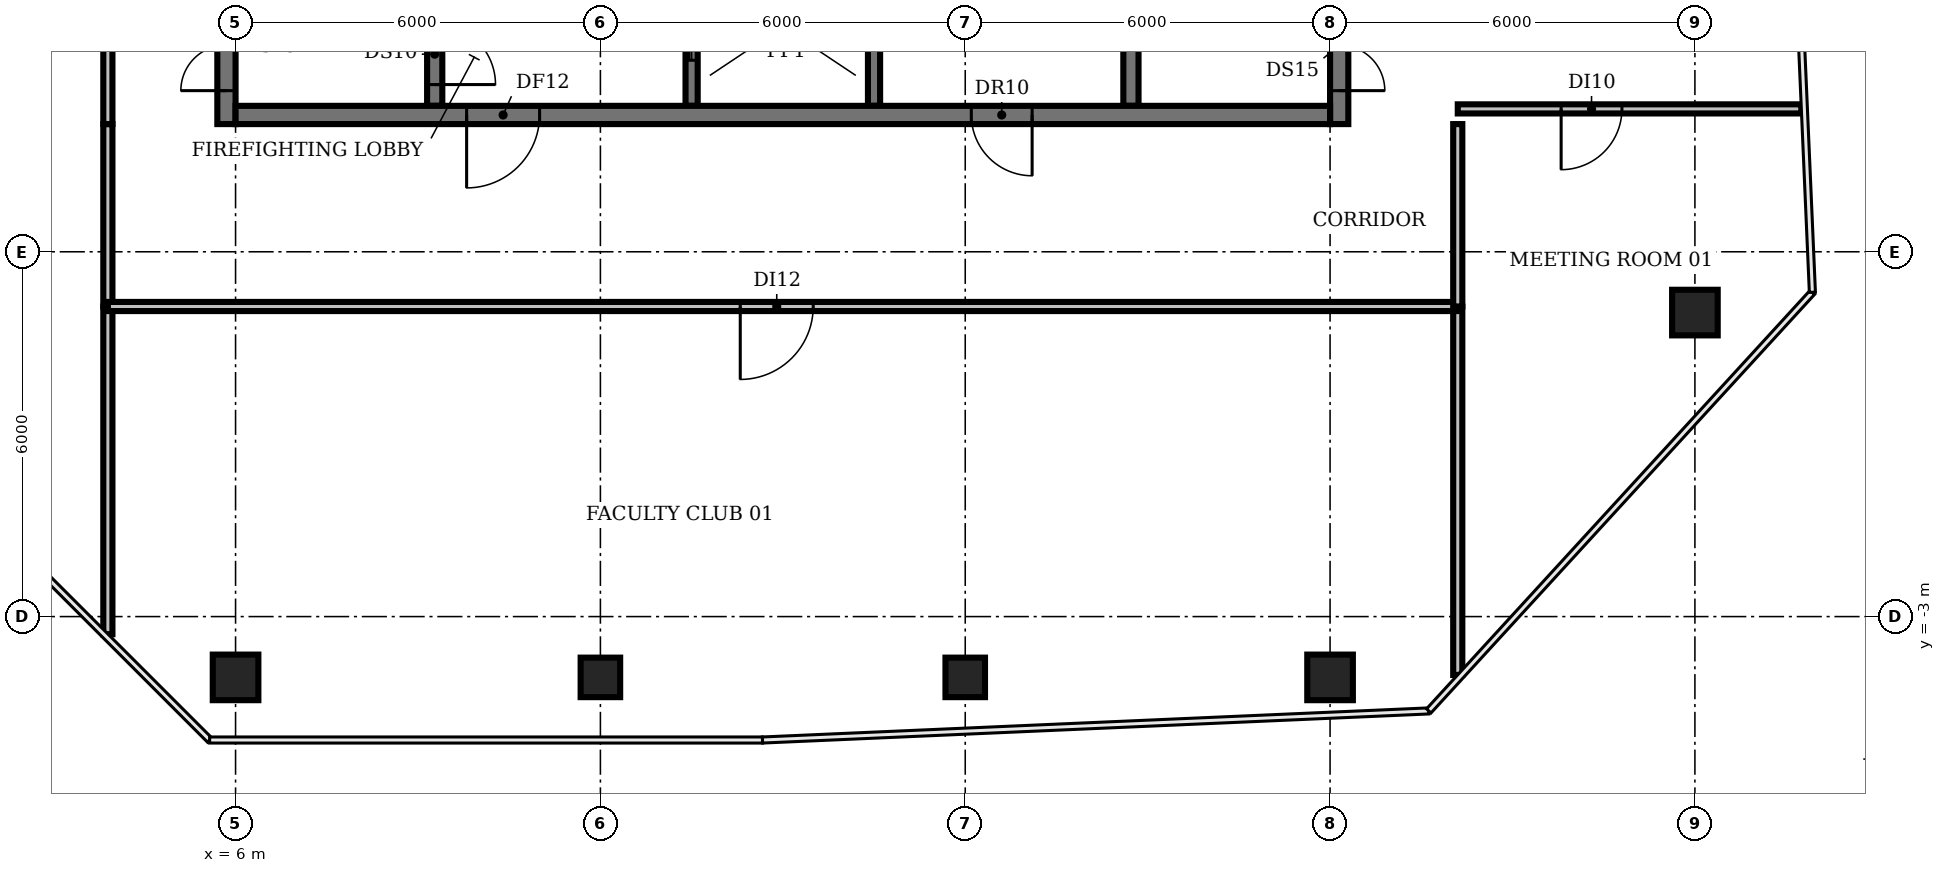
"""IFC4 building model, lengths in metres.
Left out: names, types, materials, properties, quantities, classifications, styles, units other than length and angle.
Written with IfcOpenShell. Run it as: python <this file> out.ifc"""

import sys

from ifc_helpers import new_model, si_unit, direction, frame, frame_2d, origin, origin_2d, place, context, subcontext, project, spatial, rectangle, circle, extrude, element, fill, save


model = new_model("IFC4")
c1 = context("Model", 3, precision=1e-05, world=origin(), true_north=direction((0.0, 1.0)))
c2 = subcontext(c1, "Body", "Model", "MODEL_VIEW")
j1 = project(units=[si_unit("LENGTHUNIT", "METRE"), si_unit("PLANEANGLEUNIT", "RADIAN")], contexts=[c1])
p1 = place(None, origin())
s1 = spatial("IfcSite", under=j1, at=p1, CompositionType="ELEMENT")
p2 = place(p1, origin())
s2 = spatial("IfcBuilding", under=s1, at=p2, CompositionType="ELEMENT")
p3 = place(p2, frame((0.0, 0.0, 323.0)))
s3 = spatial("IfcBuildingStorey", under=s2, at=p3, CompositionType="ELEMENT", Elevation=323.0)
p4 = place(p3, frame((6.0, -4.0, 0.0), z_axis=(0.0, 0.0, 1.0), x_axis=(1.0, 0.0, 0.0)))
e1 = element("IfcColumn", 1, at=p4, inside=s3, PredefinedType="COLUMN", context=c2, shape_type="SweptSolid", body=[
    extrude(circle(Radius=0.375, at=origin_2d()), origin(), (0.0, 0.0, 1.0), 3.9),
])
for number, where, z_axis, x_axis in (
    (2, (12.0, -4.0, 0.0), (0.0, 0.0, 1.0), (1.0, 0.0, 0.0)),
    (3, (18.0, -4.0, 0.0), (0.0, 0.0, 1.0), (1.0, 0.0, 0.0)),
):
    element("IfcColumn", number, at=place(p3, frame(where, z_axis=z_axis, x_axis=x_axis)), inside=s3, PredefinedType="COLUMN", context=c2, shape_type="SweptSolid", body=[
        extrude(rectangle(XDim=0.65, YDim=0.65, at=origin_2d()), origin(), (0.0, 0.0, 1.0), 3.9),
    ])
for number, where, z_axis, x_axis in (
    (4, (24.0, -4.0, 0.0), (0.0, 0.0, 1.0), (1.0, 0.0, 0.0)),
    (5, (30.0, 2.0, 0.0), (0.0, 0.0, 1.0), (1.0, 0.0, 0.0)),
):
    element("IfcColumn", number, at=place(p3, frame(where, z_axis=z_axis, x_axis=x_axis)), inside=s3, PredefinedType="COLUMN", context=c2, shape_type="SweptSolid", body=[
        extrude(circle(Radius=0.375, at=origin_2d()), origin(), (0.0, 0.0, 1.0), 3.9),
    ])
p5 = place(p3, frame((9.275, 11.825, 0.0), z_axis=(0.0, 0.0, 1.0), x_axis=(0.0, -1.0, 0.0)))
e6 = element("IfcWall", 6, at=p5, inside=s3, PredefinedType="SHEAR", context=c2, shape_type="SweptSolid", body=[
    extrude(rectangle(XDim=6.425, YDim=0.25, at=frame_2d((3.212, 0.0))), origin(), (0.0, 0.0, 1.0), 3.9),
])
p6 = place(p5, frame((5.075, 0.0, 0.0)))
e7 = element("IfcOpeningElement", 7, at=p6, cuts=e6, PredefinedType="OPENING", context=c2, shape_type="SweptSolid", body=[
    extrude(rectangle(XDim=1.0, YDim=2.1, at=frame_2d((0.5, 1.05))), frame((0.0, 0.135, 0.0), z_axis=(0.0, -1.0, 0.0), x_axis=(1.0, 0.0, 0.0)), (0.0, 0.0, 1.0), 0.27),
])
p7 = place(p3, frame((13.5, 5.4, 0.0), z_axis=(0.0, 0.0, 1.0), x_axis=(0.0, 1.0, 0.0)))
e8 = element("IfcWall", 8, at=p7, inside=s3, PredefinedType="SHEAR", context=c2, shape_type="SweptSolid", body=[
    extrude(rectangle(XDim=8.2, YDim=0.2, at=frame_2d((4.1, 0.0))), origin(), (0.0, 0.0, 1.0), 3.9),
])
p8 = place(p7, frame((0.75, 0.0, 0.0)))
e9 = element("IfcOpeningElement", 9, at=p8, cuts=e8, PredefinedType="OPENING", context=c2, shape_type="SweptSolid", body=[
    extrude(rectangle(XDim=1.1, YDim=2.1, at=frame_2d((0.55, 1.05))), frame((0.0, 0.11, 0.0), z_axis=(0.0, -1.0, 0.0), x_axis=(1.0, 0.0, 0.0)), (0.0, 0.0, 1.0), 0.22),
])
p9 = place(p7, frame((3.55, 0.0, 0.0)))
e10 = element("IfcOpeningElement", 10, at=p9, cuts=e8, PredefinedType="OPENING", context=c2, shape_type="SweptSolid", body=[
    extrude(rectangle(XDim=1.1, YDim=2.1, at=frame_2d((0.55, 1.05))), frame((0.0, 0.11, 0.0), z_axis=(0.0, -1.0, 0.0), x_axis=(1.0, 0.0, 0.0)), (0.0, 0.0, 1.0), 0.22),
])
p10 = place(p7, frame((6.35, 0.0, 0.0)))
e11 = element("IfcOpeningElement", 11, at=p10, cuts=e8, PredefinedType="OPENING", context=c2, shape_type="SweptSolid", body=[
    extrude(rectangle(XDim=1.1, YDim=2.1, at=frame_2d((0.55, 1.05))), frame((0.0, 0.11, 0.0), z_axis=(0.0, -1.0, 0.0), x_axis=(1.0, 0.0, 0.0)), (0.0, 0.0, 1.0), 0.22),
])
p11 = place(p3, frame((16.5, 5.4, 0.0), z_axis=(0.0, 0.0, 1.0), x_axis=(0.0, 1.0, 0.0)))
e12 = element("IfcWall", 12, at=p11, inside=s3, PredefinedType="SHEAR", context=c2, shape_type="SweptSolid", body=[
    extrude(rectangle(XDim=8.2, YDim=0.2, at=frame_2d((4.1, 0.0))), origin(), (0.0, 0.0, 1.0), 3.9),
])
p12 = place(p3, frame((20.725, 5.4, 0.0), z_axis=(0.0, 0.0, 1.0), x_axis=(0.0, 1.0, 0.0)))
e13 = element("IfcWall", 13, at=p12, inside=s3, PredefinedType="SHEAR", context=c2, shape_type="SweptSolid", body=[
    extrude(rectangle(XDim=6.3, YDim=0.25, at=frame_2d((3.15, 0.0))), origin(), (0.0, 0.0, 1.0), 3.9),
])
p13 = place(p3, frame((5.85, 5.1, 0.0), z_axis=(0.0, 0.0, 1.0), x_axis=(0.0, 1.0, 0.0)))
e14 = element("IfcWall", 14, at=p13, inside=s3, PredefinedType="SHEAR", context=c2, shape_type="SweptSolid", body=[
    extrude(rectangle(XDim=20.0, YDim=0.3, at=frame_2d((10.0, 0.0))), origin(), (0.0, 0.0, 1.0), 3.9),
])
p14 = place(p13, frame((0.55, 0.0, 0.0)))
e15 = element("IfcOpeningElement", 15, at=p14, cuts=e14, PredefinedType="OPENING", context=c2, shape_type="SweptSolid", body=[
    extrude(rectangle(XDim=1.5, YDim=2.1, at=frame_2d((0.75, 1.05))), frame((0.0, 0.16, 0.0), z_axis=(0.0, -1.0, 0.0), x_axis=(1.0, 0.0, 0.0)), (0.0, 0.0, 1.0), 0.32),
])
p15 = place(p13, frame((7.0, 0.0, 0.0)))
e16 = element("IfcOpeningElement", 16, at=p15, cuts=e14, PredefinedType="OPENING", context=c2, shape_type="SweptSolid", body=[
    extrude(rectangle(XDim=1.2, YDim=2.1, at=frame_2d((0.6, 1.05))), frame((0.0, 0.16, 0.0), z_axis=(0.0, -1.0, 0.0), x_axis=(1.0, 0.0, 0.0)), (0.0, 0.0, 1.0), 0.32),
])
p16 = place(p13, frame((13.55, 0.0, 0.0)))
e17 = element("IfcOpeningElement", 17, at=p16, cuts=e14, PredefinedType="OPENING", context=c2, shape_type="SweptSolid", body=[
    extrude(rectangle(XDim=1.2, YDim=2.1, at=frame_2d((0.6, 1.05))), frame((0.0, 0.16, 0.0), z_axis=(0.0, -1.0, 0.0), x_axis=(1.0, 0.0, 0.0)), (0.0, 0.0, 1.0), 0.32),
])
p17 = place(p3, frame((24.15, 25.705, 0.0), z_axis=(0.0, 0.0, 1.0), x_axis=(0.0, -1.0, 0.0)))
e18 = element("IfcWall", 18, at=p17, inside=s3, PredefinedType="SHEAR", context=c2, shape_type="SweptSolid", body=[
    extrude(rectangle(XDim=20.605, YDim=0.3, at=frame_2d((10.302, 0.0))), origin(), (0.0, 0.0, 1.0), 3.9),
])
p18 = place(p17, frame((18.555, 0.0, 0.0)))
e19 = element("IfcOpeningElement", 19, at=p18, cuts=e18, PredefinedType="OPENING", context=c2, shape_type="SweptSolid", body=[
    extrude(rectangle(XDim=1.5, YDim=2.1, at=frame_2d((0.75, 1.05))), frame((0.0, 0.16, 0.0), z_axis=(0.0, -1.0, 0.0), x_axis=(1.0, 0.0, 0.0)), (0.0, 0.0, 1.0), 0.32),
])
p19 = place(p17, frame((12.455, 0.0, 0.0)))
e20 = element("IfcOpeningElement", 20, at=p19, cuts=e18, PredefinedType="OPENING", context=c2, shape_type="SweptSolid", body=[
    extrude(rectangle(XDim=0.9, YDim=2.1, at=frame_2d((0.45, 1.05))), frame((0.0, 0.16, 0.0), z_axis=(0.0, -1.0, 0.0), x_axis=(1.0, 0.0, 0.0)), (0.0, 0.0, 1.0), 0.32),
])
p20 = place(p17, frame((6.455, 0.0, 0.0)))
e21 = element("IfcOpeningElement", 21, at=p20, cuts=e18, PredefinedType="OPENING", context=c2, shape_type="SweptSolid", body=[
    extrude(rectangle(XDim=2.0, YDim=2.1, at=frame_2d((1.0, 1.05))), frame((0.0, 0.16, 0.0), z_axis=(0.0, -1.0, 0.0), x_axis=(1.0, 0.0, 0.0)), (0.0, 0.0, 1.0), 0.32),
])
p21 = place(p3, frame((24.0, 5.25, 0.0), z_axis=(0.0, 0.0, 1.0), x_axis=(-1.0, 0.0, 0.0)))
e22 = element("IfcWall", 22, at=p21, inside=s3, PredefinedType="SHEAR", context=c2, shape_type="SweptSolid", body=[
    extrude(rectangle(XDim=18.0, YDim=0.3, at=frame_2d((9.0, 0.0))), origin(), (0.0, 0.0, 1.0), 3.9),
])
p22 = place(p21, frame((13.0, 0.0, 0.0)))
e23 = element("IfcOpeningElement", 23, at=p22, cuts=e22, PredefinedType="OPENING", context=c2, shape_type="SweptSolid", body=[
    extrude(rectangle(XDim=1.2, YDim=2.1, at=frame_2d((0.6, 1.05))), frame((0.0, 0.16, 0.0), z_axis=(0.0, -1.0, 0.0), x_axis=(1.0, 0.0, 0.0)), (0.0, 0.0, 1.0), 0.32),
])
p23 = place(p21, frame((4.9, 0.0, 0.0)))
e24 = element("IfcOpeningElement", 24, at=p23, cuts=e22, PredefinedType="OPENING", context=c2, shape_type="SweptSolid", body=[
    extrude(rectangle(XDim=1.0, YDim=2.1, at=frame_2d((0.5, 1.05))), frame((0.0, 0.16, 0.0), z_axis=(0.0, -1.0, 0.0), x_axis=(1.0, 0.0, 0.0)), (0.0, 0.0, 1.0), 0.32),
])
p24 = place(p3, frame((3.9, -3.29, 0.0), z_axis=(0.0, 0.0, 1.0), x_axis=(0.0, 1.0, 0.0)))
e25 = element("IfcWall", 25, at=p24, inside=s3, PredefinedType="PARTITIONING", context=c2, shape_type="SweptSolid", body=[
    extrude(rectangle(XDim=5.39, YDim=0.15, at=frame_2d((2.695, 0.0))), origin(), (0.0, 0.0, 1.0), 2.48),
])
p25 = place(p3, frame((3.9, 2.1, 0.0), z_axis=(0.0, 0.0, 1.0), x_axis=(0.0, 1.0, 0.0)))
e26 = element("IfcWall", 26, at=p25, inside=s3, PredefinedType="PARTITIONING", context=c2, shape_type="SweptSolid", body=[
    extrude(rectangle(XDim=3.0, YDim=0.15, at=frame_2d((1.5, 0.0))), origin(), (0.0, 0.0, 1.0), 2.48),
])
p26 = place(p3, frame((3.9, 5.1, 0.0), z_axis=(0.0, 0.0, 1.0), x_axis=(0.0, 1.0, 0.0)))
e27 = element("IfcWall", 27, at=p26, inside=s3, PredefinedType="PARTITIONING", context=c2, shape_type="SweptSolid", body=[
    extrude(rectangle(XDim=13.9, YDim=0.15, at=frame_2d((6.95, 0.0))), origin(), (0.0, 0.0, 1.0), 2.48),
])
p27 = place(p26, frame((6.2, 0.0, 0.0)))
e28 = element("IfcOpeningElement", 28, at=p27, cuts=e27, PredefinedType="OPENING", context=c2, shape_type="SweptSolid", body=[
    extrude(rectangle(XDim=1.2, YDim=2.1, at=frame_2d((0.6, 1.05))), frame((0.0, 0.085, 0.0), z_axis=(0.0, -1.0, 0.0), x_axis=(1.0, 0.0, 0.0)), (0.0, 0.0, 1.0), 0.17),
])
p28 = place(p3, frame((26.1, -3.96, 0.0), z_axis=(0.0, 0.0, 1.0), x_axis=(0.0, 1.0, 0.0)))
e29 = element("IfcWall", 29, at=p28, inside=s3, PredefinedType="PARTITIONING", context=c2, shape_type="SweptSolid", body=[
    extrude(rectangle(XDim=6.06, YDim=0.15, at=frame_2d((3.03, 0.0))), origin(), (0.0, 0.0, 1.0), 2.48),
])
p29 = place(p3, frame((26.1, 2.1, 0.0), z_axis=(0.0, 0.0, 1.0), x_axis=(-1.0, 0.0, 0.0)))
e30 = element("IfcWall", 30, at=p29, inside=s3, PredefinedType="PARTITIONING", context=c2, shape_type="SweptSolid", body=[
    extrude(rectangle(XDim=22.2, YDim=0.15, at=frame_2d((11.1, 0.0))), origin(), (0.0, 0.0, 1.0), 2.48),
])
p30 = place(p29, frame((10.6, 0.0, 0.0)))
e31 = element("IfcOpeningElement", 31, at=p30, cuts=e30, PredefinedType="OPENING", context=c2, shape_type="SweptSolid", body=[
    extrude(rectangle(XDim=1.2, YDim=2.1, at=frame_2d((0.6, 1.05))), frame((0.0, 0.085, 0.0), z_axis=(0.0, -1.0, 0.0), x_axis=(1.0, 0.0, 0.0)), (0.0, 0.0, 1.0), 0.17),
])
p31 = place(p3, frame((26.1, 2.1, 0.0), z_axis=(0.0, 0.0, 1.0), x_axis=(0.0, 1.0, 0.0)))
e32 = element("IfcWall", 32, at=p31, inside=s3, PredefinedType="PARTITIONING", context=c2, shape_type="SweptSolid", body=[
    extrude(rectangle(XDim=3.0, YDim=0.15, at=frame_2d((1.5, 0.0))), origin(), (0.0, 0.0, 1.0), 2.48),
])
p32 = place(p3, frame((31.75, 5.35, 0.0), z_axis=(0.0, 0.0, 1.0), x_axis=(-1.0, 0.0, 0.0)))
e33 = element("IfcWall", 33, at=p32, inside=s3, PredefinedType="PARTITIONING", context=c2, shape_type="SweptSolid", body=[
    extrude(rectangle(XDim=5.65, YDim=0.15, at=frame_2d((2.825, 0.0))), origin(), (0.0, 0.0, 1.0), 2.48),
])
p33 = place(p32, frame((2.95, 0.0, 0.0)))
e34 = element("IfcOpeningElement", 34, at=p33, cuts=e33, PredefinedType="OPENING", context=c2, shape_type="SweptSolid", body=[
    extrude(rectangle(XDim=1.0, YDim=2.1, at=frame_2d((0.5, 1.05))), frame((0.0, 0.085, 0.0), z_axis=(0.0, -1.0, 0.0), x_axis=(1.0, 0.0, 0.0)), (0.0, 0.0, 1.0), 0.17),
])
p34 = place(p6, origin())
e35 = element("IfcDoor", 35, at=p34, inside=s3, OperationType="SINGLE_SWING_RIGHT", PredefinedType="DOOR", context=c2, shape_type="SweptSolid", body=[
    extrude(rectangle(XDim=1.0, YDim=2.1, at=frame_2d((0.5, 1.05))), frame((0.0, 0.025, 0.0), z_axis=(0.0, -1.0, 0.0), x_axis=(1.0, 0.0, 0.0)), (0.0, 0.0, 1.0), 0.05),
])
fill(e7, e35)
p35 = place(p8, origin())
e36 = element("IfcDoor", 36, at=p35, inside=s3, OperationType="DOUBLE_DOOR_SLIDING", PredefinedType="DOOR", context=c2, shape_type="SweptSolid", body=[
    extrude(rectangle(XDim=1.1, YDim=2.1, at=frame_2d((0.55, 1.05))), frame((0.0, 0.025, 0.0), z_axis=(0.0, -1.0, 0.0), x_axis=(1.0, 0.0, 0.0)), (0.0, 0.0, 1.0), 0.05),
])
fill(e9, e36)
p36 = place(p14, origin())
e37 = element("IfcDoor", 37, at=p36, inside=s3, OperationType="DOUBLE_DOOR_SINGLE_SWING", PredefinedType="DOOR", context=c2, shape_type="SweptSolid", body=[
    extrude(rectangle(XDim=1.5, YDim=2.1, at=frame_2d((0.75, 1.05))), frame((0.0, 0.025, 0.0), z_axis=(0.0, -1.0, 0.0), x_axis=(1.0, 0.0, 0.0)), (0.0, 0.0, 1.0), 0.05),
])
fill(e15, e37)
p37 = place(p18, origin())
e38 = element("IfcDoor", 38, at=p37, inside=s3, OperationType="DOUBLE_DOOR_SINGLE_SWING", PredefinedType="DOOR", context=c2, shape_type="SweptSolid", body=[
    extrude(rectangle(XDim=1.5, YDim=2.1, at=frame_2d((0.75, 1.05))), frame((0.0, 0.025, 0.0), z_axis=(0.0, -1.0, 0.0), x_axis=(1.0, 0.0, 0.0)), (0.0, 0.0, 1.0), 0.05),
])
fill(e19, e38)
p38 = place(p22, origin())
e39 = element("IfcDoor", 39, at=p38, inside=s3, OperationType="SINGLE_SWING_RIGHT", PredefinedType="DOOR", context=c2, shape_type="SweptSolid", body=[
    extrude(rectangle(XDim=1.2, YDim=2.1, at=frame_2d((0.6, 1.05))), frame((0.0, 0.025, 0.0), z_axis=(0.0, -1.0, 0.0), x_axis=(1.0, 0.0, 0.0)), (0.0, 0.0, 1.0), 0.05),
])
fill(e23, e39)
p39 = place(p23, origin())
e40 = element("IfcDoor", 40, at=p39, inside=s3, OperationType="SINGLE_SWING_LEFT", PredefinedType="DOOR", context=c2, shape_type="SweptSolid", body=[
    extrude(rectangle(XDim=1.0, YDim=2.1, at=frame_2d((0.5, 1.05))), frame((0.0, 0.025, 0.0), z_axis=(0.0, -1.0, 0.0), x_axis=(1.0, 0.0, 0.0)), (0.0, 0.0, 1.0), 0.05),
])
fill(e24, e40)
p40 = place(p30, origin())
e41 = element("IfcDoor", 41, at=p40, inside=s3, OperationType="SINGLE_SWING_RIGHT", PredefinedType="DOOR", context=c2, shape_type="SweptSolid", body=[
    extrude(rectangle(XDim=1.2, YDim=2.1, at=frame_2d((0.6, 1.05))), frame((0.0, 0.025, 0.0), z_axis=(0.0, -1.0, 0.0), x_axis=(1.0, 0.0, 0.0)), (0.0, 0.0, 1.0), 0.05),
])
fill(e31, e41)
p41 = place(p33, origin())
e42 = element("IfcDoor", 42, at=p41, inside=s3, OperationType="SINGLE_SWING_RIGHT", PredefinedType="DOOR", context=c2, shape_type="SweptSolid", body=[
    extrude(rectangle(XDim=1.0, YDim=2.1, at=frame_2d((0.5, 1.05))), frame((0.0, 0.025, 0.0), z_axis=(0.0, -1.0, 0.0), x_axis=(1.0, 0.0, 0.0)), (0.0, 0.0, 1.0), 0.05),
])
fill(e34, e42)
save(model, sys.argv[1])
